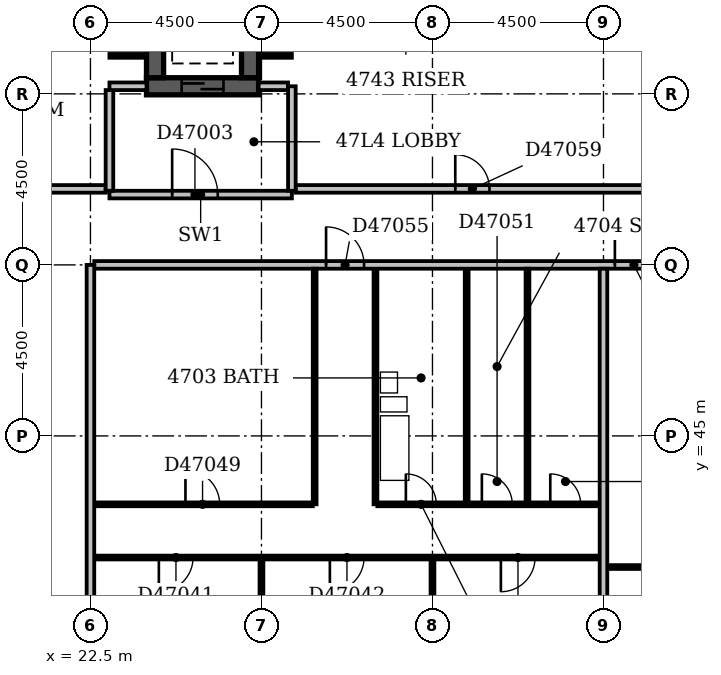
"""IFC4 building model, lengths in metres.
Left out: names, types, materials, properties, quantities, classifications, styles, units other than length and angle.
Written with IfcOpenShell. Run it as: python <this file> out.ifc"""

import sys

from ifc_helpers import new_model, si_unit, direction, frame, frame_2d, origin, place, context, subcontext, project, spatial, rectangle, extrude, element, fill, save


model = new_model("IFC4")
c1 = context("Model", 3, precision=1e-05, world=origin(), true_north=direction((0.0, 1.0)))
c2 = subcontext(c1, "Body", "Model", "MODEL_VIEW")
j1 = project(units=[si_unit("LENGTHUNIT", "METRE"), si_unit("PLANEANGLEUNIT", "RADIAN")], contexts=[c1])
p1 = place(None, origin())
s1 = spatial("IfcSite", under=j1, at=p1, CompositionType="ELEMENT")
p2 = place(p1, origin())
s2 = spatial("IfcBuilding", under=s1, at=p2, CompositionType="ELEMENT")
p3 = place(p2, frame((0.0, 0.0, 186.2)))
s3 = spatial("IfcBuildingStorey", under=s2, at=p3, CompositionType="ELEMENT", Elevation=186.2)
p4 = place(p3, frame((23.975, 54.2, -0.35), z_axis=(0.0, 0.0, 1.0), x_axis=(1.0, 0.0, 0.0)))
e1 = element("IfcWall", 1, at=p4, inside=s3, PredefinedType="SHEAR", context=c2, shape_type="SweptSolid", body=[
    extrude(rectangle(XDim=2.95, YDim=0.45, at=frame_2d((1.475, 0.0))), origin(), (0.0, 0.0, 1.0), 3.65),
])
p5 = place(p4, frame((0.925, 0.0, 0.35)))
e2 = element("IfcOpeningElement", 2, at=p5, cuts=e1, PredefinedType="OPENING", context=c2, shape_type="SweptSolid", body=[
    extrude(rectangle(XDim=1.1, YDim=2.1, at=frame_2d((0.55, 1.05))), frame((0.0, 0.237, 0.0), z_axis=(0.0, -1.0, 0.0), x_axis=(1.0, 0.0, 0.0)), (0.0, 0.0, 1.0), 0.474),
])
for number, where, z_axis, x_axis in (
    (3, (24.2, 54.425, -0.35), (0.0, 0.0, 1.0), (0.0, 1.0, 0.0)),
    (4, (26.7, 54.425, -0.35), (0.0, 0.0, 1.0), (0.0, 1.0, 0.0)),
):
    element("IfcWall", number, at=place(p3, frame(where, z_axis=z_axis, x_axis=x_axis)), inside=s3, PredefinedType="SHEAR", context=c2, shape_type="SweptSolid", body=[
        extrude(rectangle(XDim=3.35, YDim=0.45, at=frame_2d((1.675, 0.0))), origin(), (0.0, 0.0, 1.0), 3.65),
    ])
p6 = place(p3, frame((23.0, 51.35, 0.0), z_axis=(0.0, 0.0, 1.0), x_axis=(1.0, 0.0, 0.0)))
e5 = element("IfcWall", 5, at=p6, inside=s3, PredefinedType="PARTITIONING", context=c2, shape_type="SweptSolid", body=[
    extrude(rectangle(XDim=4.8, YDim=0.2, at=frame_2d((2.4, 0.0))), origin(), (0.0, 0.0, 1.0), 3.3),
])
p7 = place(p6, frame((1.65, 0.0, 0.0)))
e6 = element("IfcOpeningElement", 6, at=p7, cuts=e5, PredefinedType="OPENING", context=c2, shape_type="SweptSolid", body=[
    extrude(rectangle(XDim=1.2, YDim=2.1, at=frame_2d((0.6, 1.05))), frame((0.0, 0.112, 0.0), z_axis=(0.0, -1.0, 0.0), x_axis=(1.0, 0.0, 0.0)), (0.0, 0.0, 1.0), 0.224),
])
p8 = place(p3, frame((27.8, 51.45, 0.0), z_axis=(0.0, 0.0, 1.0), x_axis=(0.0, 1.0, 0.0)))
e7 = element("IfcWall", 7, at=p8, inside=s3, PredefinedType="PARTITIONING", context=c2, shape_type="SweptSolid", body=[
    extrude(rectangle(XDim=2.75, YDim=0.2, at=frame_2d((1.375, 0.0))), origin(), (0.0, 0.0, 1.0), 3.3),
])
p9 = place(p3, frame((23.0, 54.2, 0.0), z_axis=(0.0, 0.0, 1.0), x_axis=(1.0, 0.0, 0.0)))
e8 = element("IfcWall", 8, at=p9, inside=s3, PredefinedType="PARTITIONING", context=c2, shape_type="SweptSolid", body=[
    extrude(rectangle(XDim=0.975, YDim=0.2, at=frame_2d((0.488, 0.0))), origin(), (0.0, 0.0, 1.0), 3.3),
])
p10 = place(p3, frame((26.925, 54.2, 0.0), z_axis=(0.0, 0.0, 1.0), x_axis=(1.0, 0.0, 0.0)))
e9 = element("IfcWall", 9, at=p10, inside=s3, PredefinedType="PARTITIONING", context=c2, shape_type="SweptSolid", body=[
    extrude(rectangle(XDim=0.775, YDim=0.2, at=frame_2d((0.387, 0.0))), origin(), (0.0, 0.0, 1.0), 3.3),
])
p11 = place(p3, frame((23.0, 51.45, 0.0), z_axis=(0.0, 0.0, 1.0), x_axis=(0.0, 1.0, 0.0)))
e10 = element("IfcWall", 10, at=p11, inside=s3, PredefinedType="PARTITIONING", context=c2, shape_type="SweptSolid", body=[
    extrude(rectangle(XDim=2.65, YDim=0.2, at=frame_2d((1.325, 0.0))), origin(), (0.0, 0.0, 1.0), 3.3),
])
p12 = place(p3, frame((22.5, 36.45, 0.0), z_axis=(0.0, 0.0, 1.0), x_axis=(0.0, 1.0, 0.0)))
e11 = element("IfcWall", 11, at=p12, inside=s3, PredefinedType="PARTITIONING", context=c2, shape_type="SweptSolid", body=[
    extrude(rectangle(XDim=13.05, YDim=0.2, at=frame_2d((6.525, 0.0))), origin(), (0.0, 0.0, 1.0), 3.3),
])
p13 = place(p3, frame((27.0, 36.45, 0.0), z_axis=(0.0, 0.0, 1.0), x_axis=(0.0, 1.0, 0.0)))
e12 = element("IfcWall", 12, at=p13, inside=s3, PredefinedType="PARTITIONING", context=c2, shape_type="SweptSolid", body=[
    extrude(rectangle(XDim=5.3, YDim=0.1, at=frame_2d((2.65, 0.0))), origin(), (0.0, 0.0, 1.0), 2.4),
])
p14 = place(p3, frame((31.5, 36.45, 0.0), z_axis=(0.0, 0.0, 1.0), x_axis=(0.0, 1.0, 0.0)))
e13 = element("IfcWall", 13, at=p14, inside=s3, PredefinedType="PARTITIONING", context=c2, shape_type="SweptSolid", body=[
    extrude(rectangle(XDim=5.3, YDim=0.1, at=frame_2d((2.65, 0.0))), origin(), (0.0, 0.0, 1.0), 3.3),
])
p15 = place(p3, frame((36.0, 36.45, 0.0), z_axis=(0.0, 0.0, 1.0), x_axis=(0.0, 1.0, 0.0)))
e14 = element("IfcWall", 14, at=p15, inside=s3, PredefinedType="PARTITIONING", context=c2, shape_type="SweptSolid", body=[
    extrude(rectangle(XDim=12.95, YDim=0.2, at=frame_2d((6.475, 0.0))), origin(), (0.0, 0.0, 1.0), 2.4),
])
p16 = place(p3, frame((36.1, 41.55, 0.0), z_axis=(0.0, 0.0, 1.0), x_axis=(1.0, 0.0, 0.0)))
e15 = element("IfcWall", 15, at=p16, inside=s3, PredefinedType="PARTITIONING", context=c2, shape_type="SweptSolid", body=[
    extrude(rectangle(XDim=13.3, YDim=0.1, at=frame_2d((6.65, 0.0))), origin(), (0.0, 0.0, 1.0), 3.3),
])
p17 = place(p16, frame((3.9, 0.0, 0.0)))
e16 = element("IfcOpeningElement", 16, at=p17, cuts=e15, PredefinedType="OPENING", context=c2, shape_type="SweptSolid", body=[
    extrude(rectangle(XDim=0.9, YDim=2.1, at=frame_2d((0.45, 1.05))), frame((0.0, 0.062, 0.0), z_axis=(0.0, -1.0, 0.0), x_axis=(1.0, 0.0, 0.0)), (0.0, 0.0, 1.0), 0.124),
])
p18 = place(p16, frame((10.7, 0.0, 0.0)))
e17 = element("IfcOpeningElement", 17, at=p18, cuts=e15, PredefinedType="OPENING", context=c2, shape_type="SweptSolid", body=[
    extrude(rectangle(XDim=0.9, YDim=2.1, at=frame_2d((0.45, 1.05))), frame((0.0, 0.062, 0.0), z_axis=(0.0, -1.0, 0.0), x_axis=(1.0, 0.0, 0.0)), (0.0, 0.0, 1.0), 0.124),
])
p19 = place(p3, frame((22.6, 41.8, 0.0), z_axis=(0.0, 0.0, 1.0), x_axis=(1.0, 0.0, 0.0)))
e18 = element("IfcWall", 18, at=p19, inside=s3, PredefinedType="PARTITIONING", context=c2, shape_type="SweptSolid", body=[
    extrude(rectangle(XDim=13.3, YDim=0.1, at=frame_2d((6.65, 0.0))), origin(), (0.0, 0.0, 1.0), 3.3),
])
p20 = place(p19, frame((1.7, 0.0, 0.0)))
e19 = element("IfcOpeningElement", 19, at=p20, cuts=e18, PredefinedType="OPENING", context=c2, shape_type="SweptSolid", body=[
    extrude(rectangle(XDim=0.9, YDim=2.1, at=frame_2d((0.45, 1.05))), frame((0.0, 0.062, 0.0), z_axis=(0.0, -1.0, 0.0), x_axis=(1.0, 0.0, 0.0)), (0.0, 0.0, 1.0), 0.124),
])
p21 = place(p19, frame((6.2, 0.0, 0.0)))
e20 = element("IfcOpeningElement", 20, at=p21, cuts=e18, PredefinedType="OPENING", context=c2, shape_type="SweptSolid", body=[
    extrude(rectangle(XDim=0.9, YDim=2.1, at=frame_2d((0.45, 1.05))), frame((0.0, 0.062, 0.0), z_axis=(0.0, -1.0, 0.0), x_axis=(1.0, 0.0, 0.0)), (0.0, 0.0, 1.0), 0.124),
])
p22 = place(p19, frame((10.7, 0.0, 0.0)))
e21 = element("IfcOpeningElement", 21, at=p22, cuts=e18, PredefinedType="OPENING", context=c2, shape_type="SweptSolid", body=[
    extrude(rectangle(XDim=0.9, YDim=2.1, at=frame_2d((0.45, 1.05))), frame((0.0, 0.062, 0.0), z_axis=(0.0, -1.0, 0.0), x_axis=(1.0, 0.0, 0.0)), (0.0, 0.0, 1.0), 0.124),
])
p23 = place(p3, frame((22.6, 43.2, 0.0), z_axis=(0.0, 0.0, 1.0), x_axis=(1.0, 0.0, 0.0)))
e22 = element("IfcWall", 22, at=p23, inside=s3, PredefinedType="PARTITIONING", context=c2, shape_type="SweptSolid", body=[
    extrude(rectangle(XDim=5.75, YDim=0.1, at=frame_2d((2.875, 0.0))), origin(), (0.0, 0.0, 1.0), 3.3),
])
p24 = place(p23, frame((2.4, 0.0, 0.0)))
e23 = element("IfcOpeningElement", 23, at=p24, cuts=e22, PredefinedType="OPENING", context=c2, shape_type="SweptSolid", body=[
    extrude(rectangle(XDim=0.9, YDim=2.1, at=frame_2d((0.45, 1.05))), frame((0.0, 0.062, 0.0), z_axis=(0.0, -1.0, 0.0), x_axis=(1.0, 0.0, 0.0)), (0.0, 0.0, 1.0), 0.124),
])
p25 = place(p3, frame((28.4, 43.2, 0.0), z_axis=(0.0, 0.0, 1.0), x_axis=(0.0, 1.0, 0.0)))
e24 = element("IfcWall", 24, at=p25, inside=s3, PredefinedType="PARTITIONING", context=c2, shape_type="SweptSolid", body=[
    extrude(rectangle(XDim=6.2, YDim=0.1, at=frame_2d((3.1, 0.0))), origin(), (0.0, 0.0, 1.0), 3.3),
])
p26 = place(p3, frame((30.0, 43.2, 0.0), z_axis=(0.0, 0.0, 1.0), x_axis=(0.0, 1.0, 0.0)))
e25 = element("IfcWall", 25, at=p26, inside=s3, PredefinedType="PLUMBINGWALL", context=c2, shape_type="SweptSolid", body=[
    extrude(rectangle(XDim=6.2, YDim=0.1, at=frame_2d((3.1, 0.0))), origin(), (0.0, 0.0, 1.0), 3.3),
])
p27 = place(p3, frame((30.05, 43.2, 0.0), z_axis=(0.0, 0.0, 1.0), x_axis=(1.0, 0.0, 0.0)))
e26 = element("IfcWall", 26, at=p27, inside=s3, PredefinedType="PARTITIONING", context=c2, shape_type="SweptSolid", body=[
    extrude(rectangle(XDim=5.85, YDim=0.1, at=frame_2d((2.925, 0.0))), origin(), (0.0, 0.0, 1.0), 3.3),
])
p28 = place(p27, frame((0.75, 0.0, 0.0)))
e27 = element("IfcOpeningElement", 27, at=p28, cuts=e26, PredefinedType="OPENING", context=c2, shape_type="SweptSolid", body=[
    extrude(rectangle(XDim=0.8, YDim=2.1, at=frame_2d((0.4, 1.05))), frame((0.0, 0.062, 0.0), z_axis=(0.0, -1.0, 0.0), x_axis=(1.0, 0.0, 0.0)), (0.0, 0.0, 1.0), 0.124),
])
p29 = place(p27, frame((2.75, 0.0, 0.0)))
e28 = element("IfcOpeningElement", 28, at=p29, cuts=e26, PredefinedType="OPENING", context=c2, shape_type="SweptSolid", body=[
    extrude(rectangle(XDim=0.8, YDim=2.1, at=frame_2d((0.4, 1.05))), frame((0.0, 0.062, 0.0), z_axis=(0.0, -1.0, 0.0), x_axis=(1.0, 0.0, 0.0)), (0.0, 0.0, 1.0), 0.124),
])
p30 = place(p27, frame((4.55, 0.0, 0.0)))
e29 = element("IfcOpeningElement", 29, at=p30, cuts=e26, PredefinedType="OPENING", context=c2, shape_type="SweptSolid", body=[
    extrude(rectangle(XDim=0.8, YDim=2.1, at=frame_2d((0.4, 1.05))), frame((0.0, 0.062, 0.0), z_axis=(0.0, -1.0, 0.0), x_axis=(1.0, 0.0, 0.0)), (0.0, 0.0, 1.0), 0.124),
])
p31 = place(p3, frame((32.4, 43.25, 0.0), z_axis=(0.0, 0.0, 1.0), x_axis=(0.0, 1.0, 0.0)))
e30 = element("IfcWall", 30, at=p31, inside=s3, PredefinedType="PLUMBINGWALL", context=c2, shape_type="SweptSolid", body=[
    extrude(rectangle(XDim=6.15, YDim=0.1, at=frame_2d((3.075, 0.0))), origin(), (0.0, 0.0, 1.0), 3.3),
])
p32 = place(p3, frame((34.0, 43.25, 0.0), z_axis=(0.0, 0.0, 1.0), x_axis=(0.0, 1.0, 0.0)))
e31 = element("IfcWall", 31, at=p32, inside=s3, PredefinedType="PARTITIONING", context=c2, shape_type="SweptSolid", body=[
    extrude(rectangle(XDim=6.15, YDim=0.1, at=frame_2d((3.075, 0.0))), origin(), (0.0, 0.0, 1.0), 3.3),
])
p33 = place(p3, frame((22.6, 49.5, 0.0), z_axis=(0.0, 0.0, 1.0), x_axis=(1.0, 0.0, 0.0)))
e32 = element("IfcWall", 32, at=p33, inside=s3, PredefinedType="PARTITIONING", context=c2, shape_type="SweptSolid", body=[
    extrude(rectangle(XDim=30.95, YDim=0.2, at=frame_2d((15.475, 0.0))), origin(), (0.0, 0.0, 1.0), 3.3),
])
p34 = place(p33, frame((6.1, 0.0, 0.0)))
e33 = element("IfcOpeningElement", 33, at=p34, cuts=e32, PredefinedType="OPENING", context=c2, shape_type="SweptSolid", body=[
    extrude(rectangle(XDim=1.0, YDim=2.1, at=frame_2d((0.5, 1.05))), frame((0.0, 0.112, 0.0), z_axis=(0.0, -1.0, 0.0), x_axis=(1.0, 0.0, 0.0)), (0.0, 0.0, 1.0), 0.224),
])
p35 = place(p33, frame((13.7, 0.0, 0.0)))
e34 = element("IfcOpeningElement", 34, at=p35, cuts=e32, PredefinedType="OPENING", context=c2, shape_type="SweptSolid", body=[
    extrude(rectangle(XDim=1.0, YDim=2.1, at=frame_2d((0.5, 1.05))), frame((0.0, 0.112, 0.0), z_axis=(0.0, -1.0, 0.0), x_axis=(1.0, 0.0, 0.0)), (0.0, 0.0, 1.0), 0.224),
])
p36 = place(p33, frame((27.15, 0.0, 0.0)))
e35 = element("IfcOpeningElement", 35, at=p36, cuts=e32, PredefinedType="OPENING", context=c2, shape_type="SweptSolid", body=[
    extrude(rectangle(XDim=1.0, YDim=2.1, at=frame_2d((0.5, 1.05))), frame((0.0, 0.112, 0.0), z_axis=(0.0, -1.0, 0.0), x_axis=(1.0, 0.0, 0.0)), (0.0, 0.0, 1.0), 0.224),
])
p37 = place(p3, frame((7.6, 51.5, 0.0), z_axis=(0.0, 0.0, 1.0), x_axis=(1.0, 0.0, 0.0)))
e36 = element("IfcWall", 36, at=p37, inside=s3, PredefinedType="PARTITIONING", context=c2, shape_type="SweptSolid", body=[
    extrude(rectangle(XDim=15.3, YDim=0.2, at=frame_2d((7.65, 0.0))), origin(), (0.0, 0.0, 1.0), 3.3),
])
p38 = place(p37, frame((7.2, 0.0, 0.0)))
e37 = element("IfcOpeningElement", 37, at=p38, cuts=e36, PredefinedType="OPENING", context=c2, shape_type="SweptSolid", body=[
    extrude(rectangle(XDim=0.9, YDim=2.1, at=frame_2d((0.45, 1.05))), frame((0.0, 0.112, 0.0), z_axis=(0.0, -1.0, 0.0), x_axis=(1.0, 0.0, 0.0)), (0.0, 0.0, 1.0), 0.224),
])
p39 = place(p3, frame((27.9, 51.5, 0.0), z_axis=(0.0, 0.0, 1.0), x_axis=(1.0, 0.0, 0.0)))
e38 = element("IfcWall", 38, at=p39, inside=s3, PredefinedType="PARTITIONING", context=c2, shape_type="SweptSolid", body=[
    extrude(rectangle(XDim=9.3, YDim=0.2, at=frame_2d((4.65, 0.0))), origin(), (0.0, 0.0, 1.0), 3.3),
])
p40 = place(p39, frame((4.2, 0.0, 0.0)))
e39 = element("IfcOpeningElement", 39, at=p40, cuts=e38, PredefinedType="OPENING", context=c2, shape_type="SweptSolid", body=[
    extrude(rectangle(XDim=0.9, YDim=2.1, at=frame_2d((0.45, 1.05))), frame((0.0, 0.112, 0.0), z_axis=(0.0, -1.0, 0.0), x_axis=(1.0, 0.0, 0.0)), (0.0, 0.0, 1.0), 0.224),
])
p41 = place(p3, frame((23.0, 55.0, 0.0), z_axis=(0.0, 0.0, 1.0), x_axis=(1.0, 0.0, 0.0)))
e40 = element("IfcWall", 40, at=p41, inside=s3, PredefinedType="PARTITIONING", context=c2, shape_type="SweptSolid", body=[
    extrude(rectangle(XDim=0.975, YDim=0.1, at=frame_2d((0.488, 0.0))), origin(), (0.0, 0.0, 1.0), 3.3),
])
p42 = place(p3, frame((26.925, 55.0, 0.0), z_axis=(0.0, 0.0, 1.0), x_axis=(1.0, 0.0, 0.0)))
e41 = element("IfcWall", 41, at=p42, inside=s3, PredefinedType="PARTITIONING", context=c2, shape_type="SweptSolid", body=[
    extrude(rectangle(XDim=0.875, YDim=0.1, at=frame_2d((0.438, 0.0))), origin(), (0.0, 0.0, 1.0), 3.3),
])
p43 = place(p7, origin())
e42 = element("IfcDoor", 42, at=p43, inside=s3, OperationType="SINGLE_SWING_LEFT", PredefinedType="DOOR", context=c2, shape_type="SweptSolid", body=[
    extrude(rectangle(XDim=1.2, YDim=2.1, at=frame_2d((0.6, 1.05))), frame((0.0, 0.025, 0.0), z_axis=(0.0, -1.0, 0.0), x_axis=(1.0, 0.0, 0.0)), (0.0, 0.0, 1.0), 0.05),
])
fill(e6, e42)
p44 = place(p5, origin())
e43 = element("IfcDoor", 43, at=p44, inside=s3, OperationType="SLIDING_TO_LEFT", PredefinedType="DOOR", context=c2, shape_type="SweptSolid", body=[
    extrude(rectangle(XDim=1.1, YDim=2.1, at=frame_2d((0.55, 1.05))), frame((0.0, 0.025, 0.0), z_axis=(0.0, -1.0, 0.0), x_axis=(1.0, 0.0, 0.0)), (0.0, 0.0, 1.0), 0.05),
])
fill(e2, e43)
p45 = place(p20, frame((0.9, 0.0, 0.0), z_axis=(0.0, 0.0, 1.0), x_axis=(-1.0, 0.0, 0.0)))
e44 = element("IfcDoor", 44, at=p45, inside=s3, OperationType="SINGLE_SWING_RIGHT", PredefinedType="DOOR", context=c2, shape_type="SweptSolid", body=[
    extrude(rectangle(XDim=0.9, YDim=2.1, at=frame_2d((0.45, 1.05))), frame((0.0, 0.025, 0.0), z_axis=(0.0, -1.0, 0.0), x_axis=(1.0, 0.0, 0.0)), (0.0, 0.0, 1.0), 0.05),
])
fill(e19, e44)
p46 = place(p21, frame((0.9, 0.0, 0.0), z_axis=(0.0, 0.0, 1.0), x_axis=(-1.0, 0.0, 0.0)))
e45 = element("IfcDoor", 45, at=p46, inside=s3, OperationType="SINGLE_SWING_RIGHT", PredefinedType="DOOR", context=c2, shape_type="SweptSolid", body=[
    extrude(rectangle(XDim=0.9, YDim=2.1, at=frame_2d((0.45, 1.05))), frame((0.0, 0.025, 0.0), z_axis=(0.0, -1.0, 0.0), x_axis=(1.0, 0.0, 0.0)), (0.0, 0.0, 1.0), 0.05),
])
fill(e20, e45)
p47 = place(p22, frame((0.9, 0.0, 0.0), z_axis=(0.0, 0.0, 1.0), x_axis=(-1.0, 0.0, 0.0)))
e46 = element("IfcDoor", 46, at=p47, inside=s3, OperationType="SINGLE_SWING_RIGHT", PredefinedType="DOOR", context=c2, shape_type="SweptSolid", body=[
    extrude(rectangle(XDim=0.9, YDim=2.1, at=frame_2d((0.45, 1.05))), frame((0.0, 0.025, 0.0), z_axis=(0.0, -1.0, 0.0), x_axis=(1.0, 0.0, 0.0)), (0.0, 0.0, 1.0), 0.05),
])
fill(e21, e46)
p48 = place(p24, origin())
e47 = element("IfcDoor", 47, at=p48, inside=s3, OperationType="SINGLE_SWING_LEFT", PredefinedType="DOOR", context=c2, shape_type="SweptSolid", body=[
    extrude(rectangle(XDim=0.9, YDim=2.1, at=frame_2d((0.45, 1.05))), frame((0.0, 0.025, 0.0), z_axis=(0.0, -1.0, 0.0), x_axis=(1.0, 0.0, 0.0)), (0.0, 0.0, 1.0), 0.05),
])
fill(e23, e47)
p49 = place(p28, origin())
e48 = element("IfcDoor", 48, at=p49, inside=s3, OperationType="SINGLE_SWING_LEFT", PredefinedType="DOOR", context=c2, shape_type="SweptSolid", body=[
    extrude(rectangle(XDim=0.8, YDim=2.1, at=frame_2d((0.4, 1.05))), frame((0.0, 0.025, 0.0), z_axis=(0.0, -1.0, 0.0), x_axis=(1.0, 0.0, 0.0)), (0.0, 0.0, 1.0), 0.05),
])
fill(e27, e48)
p50 = place(p29, origin())
e49 = element("IfcDoor", 49, at=p50, inside=s3, OperationType="SINGLE_SWING_LEFT", PredefinedType="DOOR", context=c2, shape_type="SweptSolid", body=[
    extrude(rectangle(XDim=0.8, YDim=2.1, at=frame_2d((0.4, 1.05))), frame((0.0, 0.025, 0.0), z_axis=(0.0, -1.0, 0.0), x_axis=(1.0, 0.0, 0.0)), (0.0, 0.0, 1.0), 0.05),
])
fill(e28, e49)
p51 = place(p30, origin())
e50 = element("IfcDoor", 50, at=p51, inside=s3, OperationType="SINGLE_SWING_LEFT", PredefinedType="DOOR", context=c2, shape_type="SweptSolid", body=[
    extrude(rectangle(XDim=0.8, YDim=2.1, at=frame_2d((0.4, 1.05))), frame((0.0, 0.025, 0.0), z_axis=(0.0, -1.0, 0.0), x_axis=(1.0, 0.0, 0.0)), (0.0, 0.0, 1.0), 0.05),
])
fill(e29, e50)
p52 = place(p34, origin())
e51 = element("IfcDoor", 51, at=p52, inside=s3, OperationType="SINGLE_SWING_LEFT", PredefinedType="DOOR", context=c2, shape_type="SweptSolid", body=[
    extrude(rectangle(XDim=1.0, YDim=2.1, at=frame_2d((0.5, 1.05))), frame((0.0, 0.025, 0.0), z_axis=(0.0, -1.0, 0.0), x_axis=(1.0, 0.0, 0.0)), (0.0, 0.0, 1.0), 0.05),
])
fill(e33, e51)
p53 = place(p35, origin())
e52 = element("IfcDoor", 52, at=p53, inside=s3, OperationType="SINGLE_SWING_LEFT", PredefinedType="DOOR", context=c2, shape_type="SweptSolid", body=[
    extrude(rectangle(XDim=1.0, YDim=2.1, at=frame_2d((0.5, 1.05))), frame((0.0, 0.025, 0.0), z_axis=(0.0, -1.0, 0.0), x_axis=(1.0, 0.0, 0.0)), (0.0, 0.0, 1.0), 0.05),
])
fill(e34, e52)
p54 = place(p40, origin())
e53 = element("IfcDoor", 53, at=p54, inside=s3, OperationType="SINGLE_SWING_LEFT", PredefinedType="DOOR", context=c2, shape_type="SweptSolid", body=[
    extrude(rectangle(XDim=0.9, YDim=2.1, at=frame_2d((0.45, 1.05))), frame((0.0, 0.025, 0.0), z_axis=(0.0, -1.0, 0.0), x_axis=(1.0, 0.0, 0.0)), (0.0, 0.0, 1.0), 0.05),
])
fill(e39, e53)
save(model, sys.argv[1])
